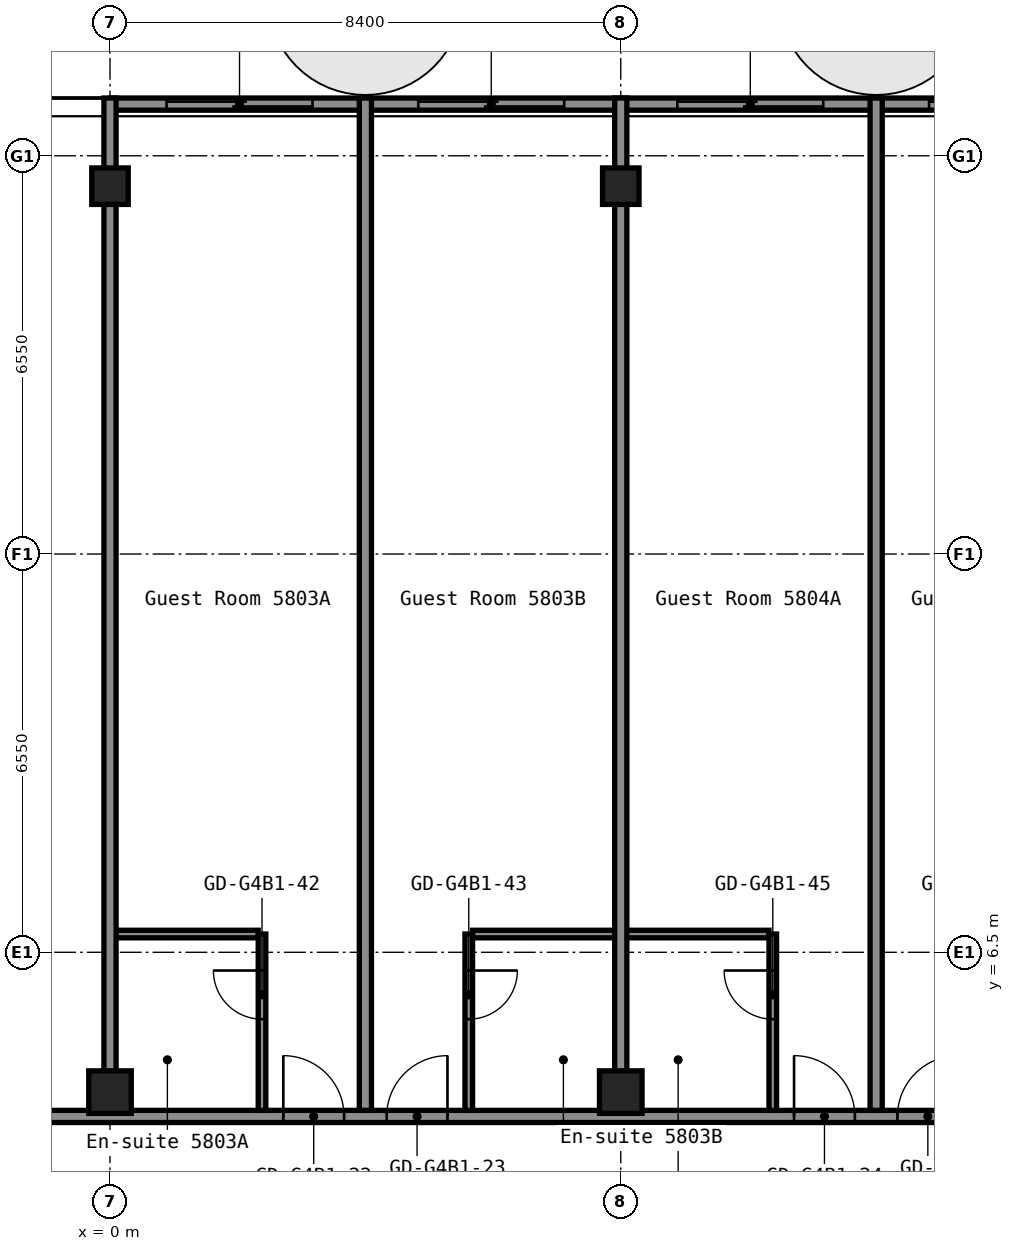
"""IFC4 building model, lengths in metres.
Left out: names, types, materials, properties, quantities, classifications, styles, units other than length and angle.
Written with IfcOpenShell. Run it as: python <this file> out.ifc"""

import sys

from ifc_helpers import new_model, si_unit, direction, frame, frame_2d, origin, origin_2d, place, context, subcontext, project, spatial, rectangle, hollow_rectangle, extrude, element, fill, save


model = new_model("IFC4")
c1 = context("Model", 3, precision=1e-05, world=origin(), true_north=direction((0.0, 1.0)))
c2 = subcontext(c1, "Body", "Model", "MODEL_VIEW")
j1 = project(units=[si_unit("LENGTHUNIT", "METRE"), si_unit("PLANEANGLEUNIT", "RADIAN")], contexts=[c1])
p1 = place(None, origin())
s1 = spatial("IfcSite", under=j1, at=p1, CompositionType="ELEMENT")
p2 = place(p1, origin())
s2 = spatial("IfcBuilding", under=s1, at=p2, CompositionType="ELEMENT")
p3 = place(p2, frame((0.0, 0.0, 205.8)))
s3 = spatial("IfcBuildingStorey", under=s2, at=p3, CompositionType="ELEMENT", Elevation=205.8)
p4 = place(p3, frame((0.0, 4.2, 0.0), z_axis=(0.0, 0.0, 1.0), x_axis=(1.0, 0.0, 0.0)))
e1 = element("IfcColumn", 1, at=p4, inside=s3, PredefinedType="COLUMN", context=c2, shape_type="SweptSolid", body=[
    extrude(hollow_rectangle(XDim=0.7, YDim=0.7, WallThickness=0.028, at=origin_2d()), origin(), (0.0, 0.0, 1.0), 2.75),
])
p5 = place(p3, frame((0.0, 19.1, 0.0), z_axis=(0.0, 0.0, 1.0), x_axis=(1.0, 0.0, 0.0)))
e2 = element("IfcColumn", 2, at=p5, inside=s3, PredefinedType="COLUMN", context=c2, shape_type="SweptSolid", body=[
    extrude(hollow_rectangle(XDim=0.6, YDim=0.6, WallThickness=0.025, InnerFilletRadius=0.038, OuterFilletRadius=0.062, at=origin_2d()), origin(), (0.0, 0.0, 1.0), 2.75),
])
p6 = place(p3, frame((8.4, 4.2, 0.0), z_axis=(0.0, 0.0, 1.0), x_axis=(1.0, 0.0, 0.0)))
e3 = element("IfcColumn", 3, at=p6, inside=s3, PredefinedType="COLUMN", context=c2, shape_type="SweptSolid", body=[
    extrude(hollow_rectangle(XDim=0.7, YDim=0.7, WallThickness=0.028, at=origin_2d()), origin(), (0.0, 0.0, 1.0), 2.75),
])
p7 = place(p3, frame((8.4, 19.1, 0.0), z_axis=(0.0, 0.0, 1.0), x_axis=(1.0, 0.0, 0.0)))
e4 = element("IfcColumn", 4, at=p7, inside=s3, PredefinedType="COLUMN", context=c2, shape_type="SweptSolid", body=[
    extrude(hollow_rectangle(XDim=0.6, YDim=0.6, WallThickness=0.025, InnerFilletRadius=0.038, OuterFilletRadius=0.062, at=origin_2d()), origin(), (0.0, 0.0, 1.0), 2.75),
])
p8 = place(p3, frame((-16.8, 3.8, 0.0), z_axis=(0.0, 0.0, 1.0), x_axis=(1.0, 0.0, 0.0)))
e5 = element("IfcWall", 5, at=p8, inside=s3, PredefinedType="PARTITIONING", context=c2, shape_type="SweptSolid", body=[
    extrude(rectangle(XDim=33.6, YDim=0.2, at=frame_2d((16.8, 0.0))), origin(), (0.0, 0.0, 1.0), 2.75),
])
p9 = place(p8, frame((2.85, 0.0, 0.0)))
e6 = element("IfcOpeningElement", 6, at=p9, cuts=e5, PredefinedType="OPENING", context=c2, shape_type="SweptSolid", body=[
    extrude(rectangle(XDim=1.0, YDim=2.1, at=frame_2d((0.5, 1.05))), frame((0.0, 0.11, 0.0), z_axis=(0.0, -1.0, 0.0), x_axis=(1.0, 0.0, 0.0)), (0.0, 0.0, 1.0), 0.22),
])
p10 = place(p8, frame((4.55, 0.0, 0.0)))
e7 = element("IfcOpeningElement", 7, at=p10, cuts=e5, PredefinedType="OPENING", context=c2, shape_type="SweptSolid", body=[
    extrude(rectangle(XDim=1.0, YDim=2.1, at=frame_2d((0.5, 1.05))), frame((0.0, 0.11, 0.0), z_axis=(0.0, -1.0, 0.0), x_axis=(1.0, 0.0, 0.0)), (0.0, 0.0, 1.0), 0.22),
])
p11 = place(p8, frame((9.545, 0.0, 0.0)))
e8 = element("IfcOpeningElement", 8, at=p11, cuts=e5, PredefinedType="OPENING", context=c2, shape_type="SweptSolid", body=[
    extrude(rectangle(XDim=0.9, YDim=2.1, at=frame_2d((0.45, 1.05))), frame((0.0, 0.11, 0.0), z_axis=(0.0, -1.0, 0.0), x_axis=(1.0, 0.0, 0.0)), (0.0, 0.0, 1.0), 0.22),
])
p12 = place(p8, frame((13.745, 0.0, 0.0)))
e9 = element("IfcOpeningElement", 9, at=p12, cuts=e5, PredefinedType="OPENING", context=c2, shape_type="SweptSolid", body=[
    extrude(rectangle(XDim=0.9, YDim=2.1, at=frame_2d((0.45, 1.05))), frame((0.0, 0.11, 0.0), z_axis=(0.0, -1.0, 0.0), x_axis=(1.0, 0.0, 0.0)), (0.0, 0.0, 1.0), 0.22),
])
p13 = place(p8, frame((19.65, 0.0, 0.0)))
e10 = element("IfcOpeningElement", 10, at=p13, cuts=e5, PredefinedType="OPENING", context=c2, shape_type="SweptSolid", body=[
    extrude(rectangle(XDim=1.0, YDim=2.1, at=frame_2d((0.5, 1.05))), frame((0.0, 0.11, 0.0), z_axis=(0.0, -1.0, 0.0), x_axis=(1.0, 0.0, 0.0)), (0.0, 0.0, 1.0), 0.22),
])
p14 = place(p8, frame((21.35, 0.0, 0.0)))
e11 = element("IfcOpeningElement", 11, at=p14, cuts=e5, PredefinedType="OPENING", context=c2, shape_type="SweptSolid", body=[
    extrude(rectangle(XDim=1.0, YDim=2.1, at=frame_2d((0.5, 1.05))), frame((0.0, 0.11, 0.0), z_axis=(0.0, -1.0, 0.0), x_axis=(1.0, 0.0, 0.0)), (0.0, 0.0, 1.0), 0.22),
])
p15 = place(p8, frame((28.05, 0.0, 0.0)))
e12 = element("IfcOpeningElement", 12, at=p15, cuts=e5, PredefinedType="OPENING", context=c2, shape_type="SweptSolid", body=[
    extrude(rectangle(XDim=1.0, YDim=2.1, at=frame_2d((0.5, 1.05))), frame((0.0, 0.11, 0.0), z_axis=(0.0, -1.0, 0.0), x_axis=(1.0, 0.0, 0.0)), (0.0, 0.0, 1.0), 0.22),
])
p16 = place(p8, frame((29.75, 0.0, 0.0)))
e13 = element("IfcOpeningElement", 13, at=p16, cuts=e5, PredefinedType="OPENING", context=c2, shape_type="SweptSolid", body=[
    extrude(rectangle(XDim=1.0, YDim=2.1, at=frame_2d((0.5, 1.05))), frame((0.0, 0.11, 0.0), z_axis=(0.0, -1.0, 0.0), x_axis=(1.0, 0.0, 0.0)), (0.0, 0.0, 1.0), 0.22),
])
p17 = place(p3, frame((0.1, 6.8, 0.0), z_axis=(0.0, 0.0, 1.0), x_axis=(1.0, 0.0, 0.0)))
e14 = element("IfcWall", 14, at=p17, inside=s3, PredefinedType="PARTITIONING", context=c2, shape_type="SweptSolid", body=[
    extrude(rectangle(XDim=2.337, YDim=0.125, at=frame_2d((1.169, 0.0))), origin(), (0.0, 0.0, 1.0), 2.75),
])
p18 = place(p3, frame((5.962, 6.8, 0.0), z_axis=(0.0, 0.0, 1.0), x_axis=(1.0, 0.0, 0.0)))
e15 = element("IfcWall", 15, at=p18, inside=s3, PredefinedType="PARTITIONING", context=c2, shape_type="SweptSolid", body=[
    extrude(rectangle(XDim=4.875, YDim=0.125, at=frame_2d((2.438, 0.0))), origin(), (0.0, 0.0, 1.0), 2.75),
])
p19 = place(p3, frame((0.0, 4.54, 0.0), z_axis=(0.0, 0.0, 1.0), x_axis=(0.0, 1.0, 0.0)))
e16 = element("IfcWall", 16, at=p19, inside=s3, PredefinedType="PARTITIONING", context=c2, shape_type="SweptSolid", body=[
    extrude(rectangle(XDim=16.01, YDim=0.2, at=frame_2d((8.005, 0.0))), origin(), (0.0, 0.0, 1.0), 2.75),
])
p20 = place(p3, frame((2.5, 3.9, 0.0), z_axis=(0.0, 0.0, 1.0), x_axis=(0.0, 1.0, 0.0)))
e17 = element("IfcWall", 17, at=p20, inside=s3, PredefinedType="PARTITIONING", context=c2, shape_type="SweptSolid", body=[
    extrude(rectangle(XDim=2.9, YDim=0.125, at=frame_2d((1.45, 0.0))), origin(), (0.0, 0.0, 1.0), 2.75),
])
p21 = place(p20, frame((1.5, 0.0, 0.0)))
e18 = element("IfcOpeningElement", 18, at=p21, cuts=e17, PredefinedType="OPENING", context=c2, shape_type="SweptSolid", body=[
    extrude(rectangle(XDim=0.8, YDim=2.1, at=frame_2d((0.4, 1.05))), frame((0.0, 0.073, 0.0), z_axis=(0.0, -1.0, 0.0), x_axis=(1.0, 0.0, 0.0)), (0.0, 0.0, 1.0), 0.145),
])
p22 = place(p3, frame((4.2, 3.9, 0.0), z_axis=(0.0, 0.0, 1.0), x_axis=(0.0, 1.0, 0.0)))
e19 = element("IfcWall", 19, at=p22, inside=s3, PredefinedType="PARTITIONING", context=c2, shape_type="SweptSolid", body=[
    extrude(rectangle(XDim=16.65, YDim=0.2, at=frame_2d((8.325, 0.0))), origin(), (0.0, 0.0, 1.0), 2.75),
])
p23 = place(p3, frame((5.9, 3.9, 0.0), z_axis=(0.0, 0.0, 1.0), x_axis=(0.0, 1.0, 0.0)))
e20 = element("IfcWall", 20, at=p23, inside=s3, PredefinedType="PARTITIONING", context=c2, shape_type="SweptSolid", body=[
    extrude(rectangle(XDim=2.9, YDim=0.125, at=frame_2d((1.45, 0.0))), origin(), (0.0, 0.0, 1.0), 2.75),
])
p24 = place(p23, frame((1.5, 0.0, 0.0)))
e21 = element("IfcOpeningElement", 21, at=p24, cuts=e20, PredefinedType="OPENING", context=c2, shape_type="SweptSolid", body=[
    extrude(rectangle(XDim=0.8, YDim=2.1, at=frame_2d((0.4, 1.05))), frame((0.0, 0.073, 0.0), z_axis=(0.0, -1.0, 0.0), x_axis=(1.0, 0.0, 0.0)), (0.0, 0.0, 1.0), 0.145),
])
p25 = place(p3, frame((8.4, 4.54, 0.0), z_axis=(0.0, 0.0, 1.0), x_axis=(0.0, 1.0, 0.0)))
e22 = element("IfcWall", 22, at=p25, inside=s3, PredefinedType="PARTITIONING", context=c2, shape_type="SweptSolid", body=[
    extrude(rectangle(XDim=16.01, YDim=0.2, at=frame_2d((8.005, 0.0))), origin(), (0.0, 0.0, 1.0), 2.75),
])
p26 = place(p3, frame((10.9, 3.9, 0.0), z_axis=(0.0, 0.0, 1.0), x_axis=(0.0, 1.0, 0.0)))
e23 = element("IfcWall", 23, at=p26, inside=s3, PredefinedType="PARTITIONING", context=c2, shape_type="SweptSolid", body=[
    extrude(rectangle(XDim=2.9, YDim=0.125, at=frame_2d((1.45, 0.0))), origin(), (0.0, 0.0, 1.0), 2.75),
])
p27 = place(p26, frame((1.5, 0.0, 0.0)))
e24 = element("IfcOpeningElement", 24, at=p27, cuts=e23, PredefinedType="OPENING", context=c2, shape_type="SweptSolid", body=[
    extrude(rectangle(XDim=0.8, YDim=2.1, at=frame_2d((0.4, 1.05))), frame((0.0, 0.073, 0.0), z_axis=(0.0, -1.0, 0.0), x_axis=(1.0, 0.0, 0.0)), (0.0, 0.0, 1.0), 0.145),
])
p28 = place(p3, frame((12.6, 3.9, 0.0), z_axis=(0.0, 0.0, 1.0), x_axis=(0.0, 1.0, 0.0)))
e25 = element("IfcWall", 25, at=p28, inside=s3, PredefinedType="PARTITIONING", context=c2, shape_type="SweptSolid", body=[
    extrude(rectangle(XDim=16.65, YDim=0.2, at=frame_2d((8.325, 0.0))), origin(), (0.0, 0.0, 1.0), 2.75),
])
p29 = place(p3, frame((16.78, 20.45, 0.0), z_axis=(0.0, 0.0, 1.0), x_axis=(-1.0, 0.0, 0.0)))
p30 = place(p29, frame((0.91, 0.0, 0.0)))
p31 = place(p30, frame((2.4, 0.0, 0.0), z_axis=(0.0, 0.0, 1.0), x_axis=(-1.0, 0.0, 0.0)))
e26 = element("IfcDoor", 26, at=p31, inside=s3, OperationType="SLIDING_TO_LEFT", PredefinedType="DOOR", context=c2, shape_type="SweptSolid", body=[
    extrude(rectangle(XDim=2.4, YDim=2.2, at=frame_2d((1.2, 1.1))), frame((0.0, 0.025, 0.0), z_axis=(0.0, -1.0, 0.0), x_axis=(1.0, 0.0, 0.0)), (0.0, 0.0, 1.0), 0.05),
])
p32 = place(p3, frame((12.64, 20.45, 0.0), z_axis=(0.0, 0.0, 1.0), x_axis=(-1.0, 0.0, 0.0)))
p33 = place(p32, frame((0.91, 0.0, 0.0)))
p34 = place(p33, frame((2.4, 0.0, 0.0), z_axis=(0.0, 0.0, 1.0), x_axis=(-1.0, 0.0, 0.0)))
e27 = element("IfcDoor", 27, at=p34, inside=s3, OperationType="SLIDING_TO_LEFT", PredefinedType="DOOR", context=c2, shape_type="SweptSolid", body=[
    extrude(rectangle(XDim=2.4, YDim=2.2, at=frame_2d((1.2, 1.1))), frame((0.0, 0.025, 0.0), z_axis=(0.0, -1.0, 0.0), x_axis=(1.0, 0.0, 0.0)), (0.0, 0.0, 1.0), 0.05),
])
p35 = place(p3, frame((8.38, 20.45, 0.0), z_axis=(0.0, 0.0, 1.0), x_axis=(-1.0, 0.0, 0.0)))
p36 = place(p35, frame((0.91, 0.0, 0.0)))
p37 = place(p36, frame((2.4, 0.0, 0.0), z_axis=(0.0, 0.0, 1.0), x_axis=(-1.0, 0.0, 0.0)))
e28 = element("IfcDoor", 28, at=p37, inside=s3, OperationType="SLIDING_TO_LEFT", PredefinedType="DOOR", context=c2, shape_type="SweptSolid", body=[
    extrude(rectangle(XDim=2.4, YDim=2.2, at=frame_2d((1.2, 1.1))), frame((0.0, 0.025, 0.0), z_axis=(0.0, -1.0, 0.0), x_axis=(1.0, 0.0, 0.0)), (0.0, 0.0, 1.0), 0.05),
])
p38 = place(p3, frame((4.24, 20.45, 0.0), z_axis=(0.0, 0.0, 1.0), x_axis=(-1.0, 0.0, 0.0)))
p39 = place(p38, frame((0.91, 0.0, 0.0)))
p40 = place(p39, frame((2.4, 0.0, 0.0), z_axis=(0.0, 0.0, 1.0), x_axis=(-1.0, 0.0, 0.0)))
e29 = element("IfcDoor", 29, at=p40, inside=s3, OperationType="SLIDING_TO_LEFT", PredefinedType="DOOR", context=c2, shape_type="SweptSolid", body=[
    extrude(rectangle(XDim=2.4, YDim=2.2, at=frame_2d((1.2, 1.1))), frame((0.0, 0.025, 0.0), z_axis=(0.0, -1.0, 0.0), x_axis=(1.0, 0.0, 0.0)), (0.0, 0.0, 1.0), 0.05),
])
p41 = place(p13, origin())
e30 = element("IfcDoor", 30, at=p41, inside=s3, OperationType="SINGLE_SWING_RIGHT", PredefinedType="DOOR", context=c2, shape_type="SweptSolid", body=[
    extrude(rectangle(XDim=1.0, YDim=2.1, at=frame_2d((0.5, 1.05))), frame((0.0, 0.025, 0.0), z_axis=(0.0, -1.0, 0.0), x_axis=(1.0, 0.0, 0.0)), (0.0, 0.0, 1.0), 0.05),
])
fill(e10, e30)
p42 = place(p14, origin())
e31 = element("IfcDoor", 31, at=p42, inside=s3, OperationType="SINGLE_SWING_LEFT", PredefinedType="DOOR", context=c2, shape_type="SweptSolid", body=[
    extrude(rectangle(XDim=1.0, YDim=2.1, at=frame_2d((0.5, 1.05))), frame((0.0, 0.025, 0.0), z_axis=(0.0, -1.0, 0.0), x_axis=(1.0, 0.0, 0.0)), (0.0, 0.0, 1.0), 0.05),
])
fill(e11, e31)
p43 = place(p15, origin())
e32 = element("IfcDoor", 32, at=p43, inside=s3, OperationType="SINGLE_SWING_RIGHT", PredefinedType="DOOR", context=c2, shape_type="SweptSolid", body=[
    extrude(rectangle(XDim=1.0, YDim=2.1, at=frame_2d((0.5, 1.05))), frame((0.0, 0.025, 0.0), z_axis=(0.0, -1.0, 0.0), x_axis=(1.0, 0.0, 0.0)), (0.0, 0.0, 1.0), 0.05),
])
fill(e12, e32)
p44 = place(p16, origin())
e33 = element("IfcDoor", 33, at=p44, inside=s3, OperationType="SINGLE_SWING_LEFT", PredefinedType="DOOR", context=c2, shape_type="SweptSolid", body=[
    extrude(rectangle(XDim=1.0, YDim=2.1, at=frame_2d((0.5, 1.05))), frame((0.0, 0.025, 0.0), z_axis=(0.0, -1.0, 0.0), x_axis=(1.0, 0.0, 0.0)), (0.0, 0.0, 1.0), 0.05),
])
fill(e13, e33)
p45 = place(p21, origin())
e34 = element("IfcDoor", 34, at=p45, inside=s3, OperationType="SINGLE_SWING_LEFT", PredefinedType="DOOR", context=c2, shape_type="SweptSolid", body=[
    extrude(rectangle(XDim=0.8, YDim=2.1, at=frame_2d((0.4, 1.05))), frame((0.0, 0.025, 0.0), z_axis=(0.0, -1.0, 0.0), x_axis=(1.0, 0.0, 0.0)), (0.0, 0.0, 1.0), 0.05),
])
fill(e18, e34)
p46 = place(p24, origin())
e35 = element("IfcDoor", 35, at=p46, inside=s3, OperationType="SINGLE_SWING_RIGHT", PredefinedType="DOOR", context=c2, shape_type="SweptSolid", body=[
    extrude(rectangle(XDim=0.8, YDim=2.1, at=frame_2d((0.4, 1.05))), frame((0.0, 0.025, 0.0), z_axis=(0.0, -1.0, 0.0), x_axis=(1.0, 0.0, 0.0)), (0.0, 0.0, 1.0), 0.05),
])
fill(e21, e35)
p47 = place(p27, origin())
e36 = element("IfcDoor", 36, at=p47, inside=s3, OperationType="SINGLE_SWING_LEFT", PredefinedType="DOOR", context=c2, shape_type="SweptSolid", body=[
    extrude(rectangle(XDim=0.8, YDim=2.1, at=frame_2d((0.4, 1.05))), frame((0.0, 0.025, 0.0), z_axis=(0.0, -1.0, 0.0), x_axis=(1.0, 0.0, 0.0)), (0.0, 0.0, 1.0), 0.05),
])
fill(e24, e36)
save(model, sys.argv[1])
